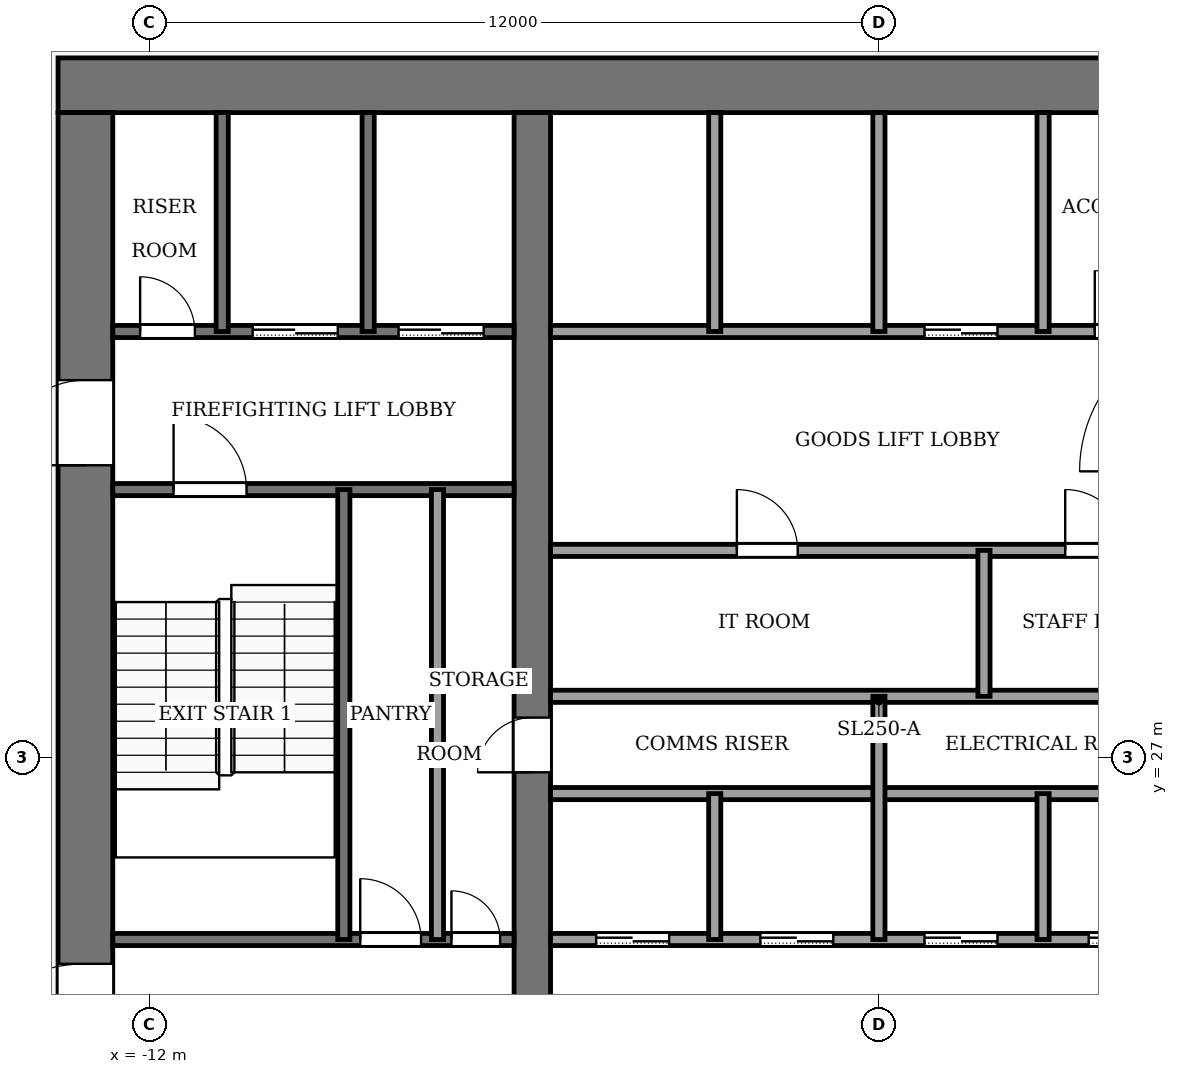
"""IFC4 building model, lengths in metres.
Left out: names, types, materials, properties, quantities, classifications, styles, units other than length and angle.
Written with IfcOpenShell. Run it as: python <this file> out.ifc"""

import sys

from ifc_helpers import new_model, si_unit, direction, frame, frame_2d, origin, place, context, subcontext, project, spatial, rectangle, extrude, element, fill, save


model = new_model("IFC4")
c1 = context("Model", 3, precision=1e-05, world=origin(), true_north=direction((0.0, 1.0)))
c2 = subcontext(c1, "Body", "Model", "MODEL_VIEW")
j1 = project(units=[si_unit("LENGTHUNIT", "METRE"), si_unit("PLANEANGLEUNIT", "RADIAN")], contexts=[c1])
p1 = place(None, origin())
s1 = spatial("IfcSite", under=j1, at=p1, CompositionType="ELEMENT")
p2 = place(p1, origin())
s2 = spatial("IfcBuilding", under=s1, at=p2, CompositionType="ELEMENT")
p3 = place(p2, frame((0.0, 0.0, 186.0)))
s3 = spatial("IfcBuildingStorey", under=s2, at=p3, CompositionType="ELEMENT", Elevation=186.0)
p4 = place(p3, frame((-13.5, 38.05, -0.13), z_axis=(0.0, 0.0, 1.0), x_axis=(1.0, 0.0, 0.0)))
e1 = element("IfcWall", 1, at=p4, inside=s3, PredefinedType="SHEAR", context=c2, shape_type="SweptSolid", body=[
    extrude(rectangle(XDim=27.0, YDim=0.9, at=frame_2d((13.5, 0.0))), origin(), (0.0, 0.0, 1.0), 4.0),
])
p5 = place(p3, frame((-13.05, 18.4, -0.13), z_axis=(0.0, 0.0, 1.0), x_axis=(0.0, 1.0, 0.0)))
e2 = element("IfcWall", 2, at=p5, inside=s3, PredefinedType="SHEAR", context=c2, shape_type="SweptSolid", body=[
    extrude(rectangle(XDim=19.2, YDim=0.9, at=frame_2d((9.6, 0.0))), origin(), (0.0, 0.0, 1.0), 4.0),
])
p6 = place(p5, frame((2.8, 0.0, 0.13)))
e3 = element("IfcOpeningElement", 3, at=p6, cuts=e2, PredefinedType="OPENING", context=c2, shape_type="SweptSolid", body=[
    extrude(rectangle(XDim=2.4, YDim=2.4, at=frame_2d((1.2, 1.2))), frame((0.0, 0.46, 0.0), z_axis=(0.0, -1.0, 0.0), x_axis=(1.0, 0.0, 0.0)), (0.0, 0.0, 1.0), 0.92),
])
p7 = place(p5, frame((13.4, 0.0, 0.13)))
e4 = element("IfcOpeningElement", 4, at=p7, cuts=e2, PredefinedType="OPENING", context=c2, shape_type="SweptSolid", body=[
    extrude(rectangle(XDim=1.4, YDim=2.2, at=frame_2d((0.7, 1.1))), frame((0.0, 0.46, 0.0), z_axis=(0.0, -1.0, 0.0), x_axis=(1.0, 0.0, 0.0)), (0.0, 0.0, 1.0), 0.92),
])
p8 = place(p3, frame((-5.7, 18.4, -0.13), z_axis=(0.0, 0.0, 1.0), x_axis=(0.0, 1.0, 0.0)))
e5 = element("IfcWall", 5, at=p8, inside=s3, PredefinedType="SHEAR", context=c2, shape_type="SweptSolid", body=[
    extrude(rectangle(XDim=19.2, YDim=0.6, at=frame_2d((9.6, 0.0))), origin(), (0.0, 0.0, 1.0), 4.0),
])
p9 = place(p8, frame((8.35, 0.0, 0.13)))
e6 = element("IfcOpeningElement", 6, at=p9, cuts=e5, PredefinedType="OPENING", context=c2, shape_type="SweptSolid", body=[
    extrude(rectangle(XDim=0.9, YDim=2.1, at=frame_2d((0.45, 1.05))), frame((0.0, 0.31, 0.0), z_axis=(0.0, -1.0, 0.0), x_axis=(1.0, 0.0, 0.0)), (0.0, 0.0, 1.0), 0.62),
])
p10 = place(p3, frame((-12.6, 24.0, 0.0), z_axis=(0.0, 0.0, 1.0), x_axis=(1.0, 0.0, 0.0)))
e7 = element("IfcWall", 7, at=p10, inside=s3, PredefinedType="PARTITIONING", context=c2, shape_type="SweptSolid", body=[
    extrude(rectangle(XDim=6.6, YDim=0.2, at=frame_2d((3.3, 0.0))), origin(), (0.0, 0.0, 1.0), 3.87),
])
p11 = place(p10, frame((4.07, 0.0, 0.0)))
e8 = element("IfcOpeningElement", 8, at=p11, cuts=e7, PredefinedType="OPENING", context=c2, shape_type="SweptSolid", body=[
    extrude(rectangle(XDim=1.0, YDim=2.1, at=frame_2d((0.5, 1.05))), frame((0.0, 0.11, 0.0), z_axis=(0.0, -1.0, 0.0), x_axis=(1.0, 0.0, 0.0)), (0.0, 0.0, 1.0), 0.22),
])
p12 = place(p10, frame((5.57, 0.0, 0.0)))
e9 = element("IfcOpeningElement", 9, at=p12, cuts=e7, PredefinedType="OPENING", context=c2, shape_type="SweptSolid", body=[
    extrude(rectangle(XDim=0.8, YDim=2.1, at=frame_2d((0.4, 1.05))), frame((0.0, 0.11, 0.0), z_axis=(0.0, -1.0, 0.0), x_axis=(1.0, 0.0, 0.0)), (0.0, 0.0, 1.0), 0.22),
])
p13 = place(p3, frame((-5.4, 24.0, 0.0), z_axis=(0.0, 0.0, 1.0), x_axis=(1.0, 0.0, 0.0)))
e10 = element("IfcWall", 10, at=p13, inside=s3, PredefinedType="PARTITIONING", context=c2, shape_type="SweptSolid", body=[
    extrude(rectangle(XDim=10.8, YDim=0.2, at=frame_2d((5.4, 0.0))), origin(), (0.0, 0.0, 1.0), 3.87),
])
p14 = place(p13, frame((0.75, 0.0, 0.0)))
e11 = element("IfcOpeningElement", 11, at=p14, cuts=e10, PredefinedType="OPENING", context=c2, shape_type="SweptSolid", body=[
    extrude(rectangle(XDim=1.2, YDim=2.2, at=frame_2d((0.6, 1.1))), frame((0.0, 0.11, 0.0), z_axis=(0.0, -1.0, 0.0), x_axis=(1.0, 0.0, 0.0)), (0.0, 0.0, 1.0), 0.22),
])
p15 = place(p13, frame((3.45, 0.0, 0.0)))
e12 = element("IfcOpeningElement", 12, at=p15, cuts=e10, PredefinedType="OPENING", context=c2, shape_type="SweptSolid", body=[
    extrude(rectangle(XDim=1.2, YDim=2.2, at=frame_2d((0.6, 1.1))), frame((0.0, 0.11, 0.0), z_axis=(0.0, -1.0, 0.0), x_axis=(1.0, 0.0, 0.0)), (0.0, 0.0, 1.0), 0.22),
])
p16 = place(p13, frame((6.15, 0.0, 0.0)))
e13 = element("IfcOpeningElement", 13, at=p16, cuts=e10, PredefinedType="OPENING", context=c2, shape_type="SweptSolid", body=[
    extrude(rectangle(XDim=1.2, YDim=2.2, at=frame_2d((0.6, 1.1))), frame((0.0, 0.11, 0.0), z_axis=(0.0, -1.0, 0.0), x_axis=(1.0, 0.0, 0.0)), (0.0, 0.0, 1.0), 0.22),
])
p17 = place(p13, frame((8.85, 0.0, 0.0)))
e14 = element("IfcOpeningElement", 14, at=p17, cuts=e10, PredefinedType="OPENING", context=c2, shape_type="SweptSolid", body=[
    extrude(rectangle(XDim=1.2, YDim=2.2, at=frame_2d((0.6, 1.1))), frame((0.0, 0.11, 0.0), z_axis=(0.0, -1.0, 0.0), x_axis=(1.0, 0.0, 0.0)), (0.0, 0.0, 1.0), 0.22),
])
for number, where, z_axis, x_axis in (
    (15, (-5.4, 26.4, 0.0), (0.0, 0.0, 1.0), (1.0, 0.0, 0.0)),
    (16, (-5.4, 28.0, 0.0), (0.0, 0.0, 1.0), (1.0, 0.0, 0.0)),
):
    element("IfcWall", number, at=place(p3, frame(where, z_axis=z_axis, x_axis=x_axis)), inside=s3, PredefinedType="PARTITIONING", context=c2, shape_type="SweptSolid", body=[
        extrude(rectangle(XDim=10.8, YDim=0.2, at=frame_2d((5.4, 0.0))), origin(), (0.0, 0.0, 1.0), 3.87),
    ])
p18 = place(p3, frame((-5.4, 30.4, 0.0), z_axis=(0.0, 0.0, 1.0), x_axis=(1.0, 0.0, 0.0)))
e17 = element("IfcWall", 17, at=p18, inside=s3, PredefinedType="PARTITIONING", context=c2, shape_type="SweptSolid", body=[
    extrude(rectangle(XDim=10.8, YDim=0.2, at=frame_2d((5.4, 0.0))), origin(), (0.0, 0.0, 1.0), 3.87),
])
p19 = place(p18, frame((3.064, 0.0, 0.0)))
e18 = element("IfcOpeningElement", 18, at=p19, cuts=e17, PredefinedType="OPENING", context=c2, shape_type="SweptSolid", body=[
    extrude(rectangle(XDim=1.0, YDim=2.1, at=frame_2d((0.5, 1.05))), frame((0.0, 0.11, 0.0), z_axis=(0.0, -1.0, 0.0), x_axis=(1.0, 0.0, 0.0)), (0.0, 0.0, 1.0), 0.22),
])
p20 = place(p18, frame((8.464, 0.0, 0.0)))
e19 = element("IfcOpeningElement", 19, at=p20, cuts=e17, PredefinedType="OPENING", context=c2, shape_type="SweptSolid", body=[
    extrude(rectangle(XDim=1.0, YDim=2.1, at=frame_2d((0.5, 1.05))), frame((0.0, 0.11, 0.0), z_axis=(0.0, -1.0, 0.0), x_axis=(1.0, 0.0, 0.0)), (0.0, 0.0, 1.0), 0.22),
])
p21 = place(p3, frame((-12.6, 31.4, 0.0), z_axis=(0.0, 0.0, 1.0), x_axis=(1.0, 0.0, 0.0)))
e20 = element("IfcWall", 20, at=p21, inside=s3, PredefinedType="PARTITIONING", context=c2, shape_type="SweptSolid", body=[
    extrude(rectangle(XDim=6.6, YDim=0.2, at=frame_2d((3.3, 0.0))), origin(), (0.0, 0.0, 1.0), 3.87),
])
p22 = place(p21, frame((1.0, 0.0, 0.0)))
e21 = element("IfcOpeningElement", 21, at=p22, cuts=e20, PredefinedType="OPENING", context=c2, shape_type="SweptSolid", body=[
    extrude(rectangle(XDim=1.2, YDim=2.2, at=frame_2d((0.6, 1.1))), frame((0.0, 0.11, 0.0), z_axis=(0.0, -1.0, 0.0), x_axis=(1.0, 0.0, 0.0)), (0.0, 0.0, 1.0), 0.22),
])
p23 = place(p3, frame((-12.6, 34.0, 0.0), z_axis=(0.0, 0.0, 1.0), x_axis=(1.0, 0.0, 0.0)))
e22 = element("IfcWall", 22, at=p23, inside=s3, PredefinedType="PARTITIONING", context=c2, shape_type="SweptSolid", body=[
    extrude(rectangle(XDim=6.6, YDim=0.2, at=frame_2d((3.3, 0.0))), origin(), (0.0, 0.0, 1.0), 3.87),
])
p24 = place(p23, frame((4.7, 0.0, 0.0)))
e23 = element("IfcOpeningElement", 23, at=p24, cuts=e22, PredefinedType="OPENING", context=c2, shape_type="SweptSolid", body=[
    extrude(rectangle(XDim=1.4, YDim=2.2, at=frame_2d((0.7, 1.1))), frame((0.0, 0.11, 0.0), z_axis=(0.0, -1.0, 0.0), x_axis=(1.0, 0.0, 0.0)), (0.0, 0.0, 1.0), 0.22),
])
p25 = place(p23, frame((2.3, 0.0, 0.0)))
e24 = element("IfcOpeningElement", 24, at=p25, cuts=e22, PredefinedType="OPENING", context=c2, shape_type="SweptSolid", body=[
    extrude(rectangle(XDim=1.4, YDim=2.2, at=frame_2d((0.7, 1.1))), frame((0.0, 0.11, 0.0), z_axis=(0.0, -1.0, 0.0), x_axis=(1.0, 0.0, 0.0)), (0.0, 0.0, 1.0), 0.22),
])
p26 = place(p23, frame((0.45, 0.0, 0.0)))
e25 = element("IfcOpeningElement", 25, at=p26, cuts=e22, PredefinedType="OPENING", context=c2, shape_type="SweptSolid", body=[
    extrude(rectangle(XDim=0.9, YDim=2.1, at=frame_2d((0.45, 1.05))), frame((0.0, 0.11, 0.0), z_axis=(0.0, -1.0, 0.0), x_axis=(1.0, 0.0, 0.0)), (0.0, 0.0, 1.0), 0.22),
])
p27 = place(p3, frame((-5.4, 34.0, 0.0), z_axis=(0.0, 0.0, 1.0), x_axis=(1.0, 0.0, 0.0)))
e26 = element("IfcWall", 26, at=p27, inside=s3, PredefinedType="PARTITIONING", context=c2, shape_type="SweptSolid", body=[
    extrude(rectangle(XDim=10.8, YDim=0.2, at=frame_2d((5.4, 0.0))), origin(), (0.0, 0.0, 1.0), 3.87),
])
p28 = place(p27, frame((6.15, 0.0, 0.0)))
e27 = element("IfcOpeningElement", 27, at=p28, cuts=e26, PredefinedType="OPENING", context=c2, shape_type="SweptSolid", body=[
    extrude(rectangle(XDim=1.2, YDim=2.2, at=frame_2d((0.6, 1.1))), frame((0.0, 0.11, 0.0), z_axis=(0.0, -1.0, 0.0), x_axis=(1.0, 0.0, 0.0)), (0.0, 0.0, 1.0), 0.22),
])
p29 = place(p27, frame((8.95, 0.0, 0.0)))
e28 = element("IfcOpeningElement", 28, at=p29, cuts=e26, PredefinedType="OPENING", context=c2, shape_type="SweptSolid", body=[
    extrude(rectangle(XDim=1.0, YDim=2.1, at=frame_2d((0.5, 1.05))), frame((0.0, 0.11, 0.0), z_axis=(0.0, -1.0, 0.0), x_axis=(1.0, 0.0, 0.0)), (0.0, 0.0, 1.0), 0.22),
])
p30 = place(p3, frame((-10.8, 34.0, 0.0), z_axis=(0.0, 0.0, 1.0), x_axis=(0.0, 1.0, 0.0)))
e29 = element("IfcWall", 29, at=p30, inside=s3, PredefinedType="PARTITIONING", context=c2, shape_type="SweptSolid", body=[
    extrude(rectangle(XDim=3.6, YDim=0.2, at=frame_2d((1.8, 0.0))), origin(), (0.0, 0.0, 1.0), 3.87),
])
p31 = place(p3, frame((-8.8, 24.0, 0.0), z_axis=(0.0, 0.0, 1.0), x_axis=(0.0, 1.0, 0.0)))
e30 = element("IfcWall", 30, at=p31, inside=s3, PredefinedType="PARTITIONING", context=c2, shape_type="SweptSolid", body=[
    extrude(rectangle(XDim=7.4, YDim=0.2, at=frame_2d((3.7, 0.0))), origin(), (0.0, 0.0, 1.0), 3.87),
])
p32 = place(p3, frame((-8.4, 34.0, 0.0), z_axis=(0.0, 0.0, 1.0), x_axis=(0.0, 1.0, 0.0)))
e31 = element("IfcWall", 31, at=p32, inside=s3, PredefinedType="PARTITIONING", context=c2, shape_type="SweptSolid", body=[
    extrude(rectangle(XDim=3.6, YDim=0.2, at=frame_2d((1.8, 0.0))), origin(), (0.0, 0.0, 1.0), 3.87),
])
p33 = place(p3, frame((-7.26, 24.0, 0.0), z_axis=(0.0, 0.0, 1.0), x_axis=(0.0, 1.0, 0.0)))
e32 = element("IfcWall", 32, at=p33, inside=s3, PredefinedType="PARTITIONING", context=c2, shape_type="SweptSolid", body=[
    extrude(rectangle(XDim=7.4, YDim=0.2, at=frame_2d((3.7, 0.0))), origin(), (0.0, 0.0, 1.0), 3.87),
])
p34 = place(p3, frame((-2.7, 24.0, 0.0), z_axis=(0.0, 0.0, 1.0), x_axis=(0.0, 1.0, 0.0)))
e33 = element("IfcWall", 33, at=p34, inside=s3, PredefinedType="PARTITIONING", context=c2, shape_type="SweptSolid", body=[
    extrude(rectangle(XDim=2.4, YDim=0.2, at=frame_2d((1.2, 0.0))), origin(), (0.0, 0.0, 1.0), 3.87),
])
p35 = place(p3, frame((-2.7, 34.0, 0.0), z_axis=(0.0, 0.0, 1.0), x_axis=(0.0, 1.0, 0.0)))
e34 = element("IfcWall", 34, at=p35, inside=s3, PredefinedType="PARTITIONING", context=c2, shape_type="SweptSolid", body=[
    extrude(rectangle(XDim=3.6, YDim=0.2, at=frame_2d((1.8, 0.0))), origin(), (0.0, 0.0, 1.0), 3.87),
])
p36 = place(p3, frame((0.0, 24.0, 0.0), z_axis=(0.0, 0.0, 1.0), x_axis=(0.0, 1.0, 0.0)))
e35 = element("IfcWall", 35, at=p36, inside=s3, PredefinedType="PARTITIONING", context=c2, shape_type="SweptSolid", body=[
    extrude(rectangle(XDim=4.0, YDim=0.2, at=frame_2d((2.0, 0.0))), origin(), (0.0, 0.0, 1.0), 3.87),
])
p37 = place(p3, frame((0.0, 34.0, 0.0), z_axis=(0.0, 0.0, 1.0), x_axis=(0.0, 1.0, 0.0)))
e36 = element("IfcWall", 36, at=p37, inside=s3, PredefinedType="PARTITIONING", context=c2, shape_type="SweptSolid", body=[
    extrude(rectangle(XDim=3.6, YDim=0.2, at=frame_2d((1.8, 0.0))), origin(), (0.0, 0.0, 1.0), 3.87),
])
for number, where, z_axis, x_axis in (
    (37, (1.728, 28.0, 0.0), (0.0, 0.0, 1.0), (0.0, 1.0, 0.0)),
    (38, (2.7, 24.0, 0.0), (0.0, 0.0, 1.0), (0.0, 1.0, 0.0)),
):
    element("IfcWall", number, at=place(p3, frame(where, z_axis=z_axis, x_axis=x_axis)), inside=s3, PredefinedType="PARTITIONING", context=c2, shape_type="SweptSolid", body=[
        extrude(rectangle(XDim=2.4, YDim=0.2, at=frame_2d((1.2, 0.0))), origin(), (0.0, 0.0, 1.0), 3.87),
    ])
p38 = place(p3, frame((2.7, 34.0, 0.0), z_axis=(0.0, 0.0, 1.0), x_axis=(0.0, 1.0, 0.0)))
e39 = element("IfcWall", 39, at=p38, inside=s3, PredefinedType="PARTITIONING", context=c2, shape_type="SweptSolid", body=[
    extrude(rectangle(XDim=3.6, YDim=0.2, at=frame_2d((1.8, 0.0))), origin(), (0.0, 0.0, 1.0), 3.87),
])
p39 = place(p14, origin())
e40 = element("IfcDoor", 40, at=p39, inside=s3, OperationType="SLIDING_TO_LEFT", PredefinedType="DOOR", context=c2, shape_type="SweptSolid", body=[
    extrude(rectangle(XDim=1.2, YDim=2.2, at=frame_2d((0.6, 1.1))), frame((0.0, 0.025, 0.0), z_axis=(0.0, -1.0, 0.0), x_axis=(1.0, 0.0, 0.0)), (0.0, 0.0, 1.0), 0.05),
])
fill(e11, e40)
p40 = place(p15, origin())
e41 = element("IfcDoor", 41, at=p40, inside=s3, OperationType="SLIDING_TO_LEFT", PredefinedType="DOOR", context=c2, shape_type="SweptSolid", body=[
    extrude(rectangle(XDim=1.2, YDim=2.2, at=frame_2d((0.6, 1.1))), frame((0.0, 0.025, 0.0), z_axis=(0.0, -1.0, 0.0), x_axis=(1.0, 0.0, 0.0)), (0.0, 0.0, 1.0), 0.05),
])
fill(e12, e41)
p41 = place(p16, origin())
e42 = element("IfcDoor", 42, at=p41, inside=s3, OperationType="SLIDING_TO_LEFT", PredefinedType="DOOR", context=c2, shape_type="SweptSolid", body=[
    extrude(rectangle(XDim=1.2, YDim=2.2, at=frame_2d((0.6, 1.1))), frame((0.0, 0.025, 0.0), z_axis=(0.0, -1.0, 0.0), x_axis=(1.0, 0.0, 0.0)), (0.0, 0.0, 1.0), 0.05),
])
fill(e13, e42)
p42 = place(p17, origin())
e43 = element("IfcDoor", 43, at=p42, inside=s3, OperationType="SLIDING_TO_LEFT", PredefinedType="DOOR", context=c2, shape_type="SweptSolid", body=[
    extrude(rectangle(XDim=1.2, YDim=2.2, at=frame_2d((0.6, 1.1))), frame((0.0, 0.025, 0.0), z_axis=(0.0, -1.0, 0.0), x_axis=(1.0, 0.0, 0.0)), (0.0, 0.0, 1.0), 0.05),
])
fill(e14, e43)
p43 = place(p28, origin())
e44 = element("IfcDoor", 44, at=p43, inside=s3, OperationType="SLIDING_TO_LEFT", PredefinedType="DOOR", context=c2, shape_type="SweptSolid", body=[
    extrude(rectangle(XDim=1.2, YDim=2.2, at=frame_2d((0.6, 1.1))), frame((0.0, 0.025, 0.0), z_axis=(0.0, -1.0, 0.0), x_axis=(1.0, 0.0, 0.0)), (0.0, 0.0, 1.0), 0.05),
])
fill(e27, e44)
p44 = place(p24, origin())
e45 = element("IfcDoor", 45, at=p44, inside=s3, OperationType="SLIDING_TO_LEFT", PredefinedType="DOOR", context=c2, shape_type="SweptSolid", body=[
    extrude(rectangle(XDim=1.4, YDim=2.2, at=frame_2d((0.7, 1.1))), frame((0.0, 0.025, 0.0), z_axis=(0.0, -1.0, 0.0), x_axis=(1.0, 0.0, 0.0)), (0.0, 0.0, 1.0), 0.05),
])
fill(e23, e45)
p45 = place(p25, origin())
e46 = element("IfcDoor", 46, at=p45, inside=s3, OperationType="SLIDING_TO_LEFT", PredefinedType="DOOR", context=c2, shape_type="SweptSolid", body=[
    extrude(rectangle(XDim=1.4, YDim=2.2, at=frame_2d((0.7, 1.1))), frame((0.0, 0.025, 0.0), z_axis=(0.0, -1.0, 0.0), x_axis=(1.0, 0.0, 0.0)), (0.0, 0.0, 1.0), 0.05),
])
fill(e24, e46)
p46 = place(p26, origin())
e47 = element("IfcDoor", 47, at=p46, inside=s3, OperationType="SINGLE_SWING_RIGHT", PredefinedType="DOOR", context=c2, shape_type="SweptSolid", body=[
    extrude(rectangle(XDim=0.9, YDim=2.1, at=frame_2d((0.45, 1.05))), frame((0.0, 0.025, 0.0), z_axis=(0.0, -1.0, 0.0), x_axis=(1.0, 0.0, 0.0)), (0.0, 0.0, 1.0), 0.05),
])
fill(e25, e47)
p47 = place(p19, origin())
e48 = element("IfcDoor", 48, at=p47, inside=s3, OperationType="SINGLE_SWING_RIGHT", PredefinedType="DOOR", context=c2, shape_type="SweptSolid", body=[
    extrude(rectangle(XDim=1.0, YDim=2.1, at=frame_2d((0.5, 1.05))), frame((0.0, 0.025, 0.0), z_axis=(0.0, -1.0, 0.0), x_axis=(1.0, 0.0, 0.0)), (0.0, 0.0, 1.0), 0.05),
])
fill(e18, e48)
p48 = place(p20, origin())
e49 = element("IfcDoor", 49, at=p48, inside=s3, OperationType="SINGLE_SWING_LEFT", PredefinedType="DOOR", context=c2, shape_type="SweptSolid", body=[
    extrude(rectangle(XDim=1.0, YDim=2.1, at=frame_2d((0.5, 1.05))), frame((0.0, 0.025, 0.0), z_axis=(0.0, -1.0, 0.0), x_axis=(1.0, 0.0, 0.0)), (0.0, 0.0, 1.0), 0.05),
])
fill(e19, e49)
p49 = place(p11, origin())
e50 = element("IfcDoor", 50, at=p49, inside=s3, OperationType="SINGLE_SWING_RIGHT", PredefinedType="DOOR", context=c2, shape_type="SweptSolid", body=[
    extrude(rectangle(XDim=1.0, YDim=2.1, at=frame_2d((0.5, 1.05))), frame((0.0, 0.025, 0.0), z_axis=(0.0, -1.0, 0.0), x_axis=(1.0, 0.0, 0.0)), (0.0, 0.0, 1.0), 0.05),
])
fill(e8, e50)
p50 = place(p12, origin())
e51 = element("IfcDoor", 51, at=p50, inside=s3, OperationType="SINGLE_SWING_LEFT", PredefinedType="DOOR", context=c2, shape_type="SweptSolid", body=[
    extrude(rectangle(XDim=0.8, YDim=2.1, at=frame_2d((0.4, 1.05))), frame((0.0, 0.025, 0.0), z_axis=(0.0, -1.0, 0.0), x_axis=(1.0, 0.0, 0.0)), (0.0, 0.0, 1.0), 0.05),
])
fill(e9, e51)
p51 = place(p29, origin())
e52 = element("IfcDoor", 52, at=p51, inside=s3, OperationType="SINGLE_SWING_LEFT", PredefinedType="DOOR", context=c2, shape_type="SweptSolid", body=[
    extrude(rectangle(XDim=1.0, YDim=2.1, at=frame_2d((0.5, 1.05))), frame((0.0, 0.025, 0.0), z_axis=(0.0, -1.0, 0.0), x_axis=(1.0, 0.0, 0.0)), (0.0, 0.0, 1.0), 0.05),
])
fill(e28, e52)
p52 = place(p9, origin())
e53 = element("IfcDoor", 53, at=p52, inside=s3, OperationType="SINGLE_SWING_LEFT", PredefinedType="DOOR", context=c2, shape_type="SweptSolid", body=[
    extrude(rectangle(XDim=0.9, YDim=2.1, at=frame_2d((0.45, 1.05))), frame((0.0, 0.025, 0.0), z_axis=(0.0, -1.0, 0.0), x_axis=(1.0, 0.0, 0.0)), (0.0, 0.0, 1.0), 0.05),
])
fill(e6, e53)
p53 = place(p22, origin())
e54 = element("IfcDoor", 54, at=p53, inside=s3, OperationType="SINGLE_SWING_RIGHT", PredefinedType="DOOR", context=c2, shape_type="SweptSolid", body=[
    extrude(rectangle(XDim=1.2, YDim=2.2, at=frame_2d((0.6, 1.1))), frame((0.0, 0.025, 0.0), z_axis=(0.0, -1.0, 0.0), x_axis=(1.0, 0.0, 0.0)), (0.0, 0.0, 1.0), 0.05),
])
fill(e21, e54)
p54 = place(p6, origin())
e55 = element("IfcDoor", 55, at=p54, inside=s3, OperationType="DOUBLE_DOOR_SINGLE_SWING", PredefinedType="DOOR", context=c2, shape_type="SweptSolid", body=[
    extrude(rectangle(XDim=2.4, YDim=2.4, at=frame_2d((1.2, 1.2))), frame((0.0, 0.025, 0.0), z_axis=(0.0, -1.0, 0.0), x_axis=(1.0, 0.0, 0.0)), (0.0, 0.0, 1.0), 0.05),
])
fill(e3, e55)
p55 = place(p7, origin())
e56 = element("IfcDoor", 56, at=p55, inside=s3, OperationType="SINGLE_SWING_RIGHT", PredefinedType="DOOR", context=c2, shape_type="SweptSolid", body=[
    extrude(rectangle(XDim=1.4, YDim=2.2, at=frame_2d((0.7, 1.1))), frame((0.0, 0.025, 0.0), z_axis=(0.0, -1.0, 0.0), x_axis=(1.0, 0.0, 0.0)), (0.0, 0.0, 1.0), 0.05),
])
fill(e4, e56)
save(model, sys.argv[1])
